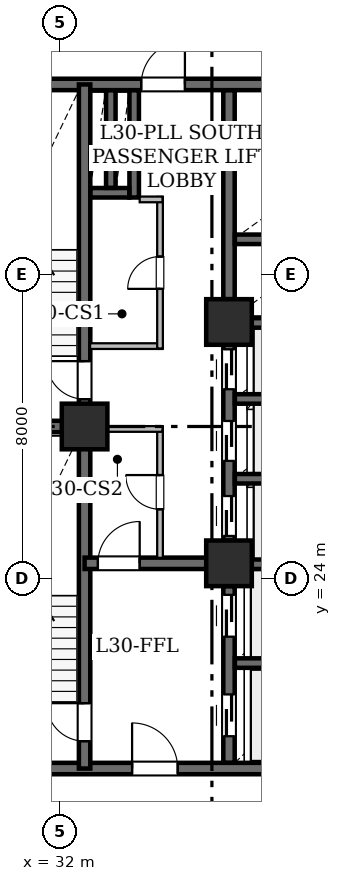
"""IFC4 building model, lengths in metres.
Left out: names, types, materials, properties, quantities, classifications, styles, units other than length and angle.
Written with IfcOpenShell. Run it as: python <this file> out.ifc"""

import sys

from ifc_helpers import new_model, si_unit, direction, frame, frame_2d, origin, origin_2d, place, context, subcontext, project, spatial, rectangle, hollow_rectangle, extrude, element, fill, save


model = new_model("IFC4")
c1 = context("Model", 3, precision=1e-05, world=origin(), true_north=direction((0.0, 1.0)))
c2 = subcontext(c1, "Body", "Model", "MODEL_VIEW")
j1 = project(units=[si_unit("LENGTHUNIT", "METRE"), si_unit("PLANEANGLEUNIT", "RADIAN")], contexts=[c1])
p1 = place(None, origin())
s1 = spatial("IfcSite", under=j1, at=p1, CompositionType="ELEMENT")
p2 = place(p1, origin())
s2 = spatial("IfcBuilding", under=s1, at=p2, CompositionType="ELEMENT")
p3 = place(p2, frame((0.0, 0.0, 120.15)))
s3 = spatial("IfcBuildingStorey", under=s2, at=p3, CompositionType="ELEMENT", Elevation=120.15)
for number, where, z_axis, x_axis in (
    (1, (32.65, 28.0, 0.0), (0.0, 0.0, 1.0), (1.0, 0.0, 0.0)),
    (2, (36.45, 24.4, 0.0), (0.0, 0.0, 1.0), (1.0, 0.0, 0.0)),
    (3, (36.45, 30.75, 0.0), (0.0, 0.0, 1.0), (1.0, 0.0, 0.0)),
):
    element("IfcColumn", number, at=place(p3, frame(where, z_axis=z_axis, x_axis=x_axis)), inside=s3, PredefinedType="COLUMN", context=c2, shape_type="SweptSolid", body=[
        extrude(hollow_rectangle(XDim=1.2, YDim=1.2, WallThickness=0.06, at=origin_2d()), origin(), (0.0, 0.0, 1.0), 3.65),
    ])
p4 = place(p3, frame((29.0, 19.0, 0.0), z_axis=(0.0, 0.0, 1.0), x_axis=(1.0, 0.0, 0.0)))
e4 = element("IfcWall", 4, at=p4, inside=s3, PredefinedType="SHEAR", context=c2, shape_type="SweptSolid", body=[
    extrude(rectangle(XDim=10.4, YDim=0.3, at=frame_2d((5.2, 0.0))), origin(), (0.0, 0.0, 1.0), 3.43),
])
p5 = place(p4, frame((4.9, 0.0, 0.0)))
e5 = element("IfcOpeningElement", 5, at=p5, cuts=e4, PredefinedType="OPENING", context=c2, shape_type="SweptSolid", body=[
    extrude(rectangle(XDim=1.2, YDim=2.15, at=frame_2d((0.6, 1.075))), frame((0.0, 0.16, 0.0), z_axis=(0.0, -1.0, 0.0), x_axis=(1.0, 0.0, 0.0)), (0.0, 0.0, 1.0), 0.32),
])
p6 = place(p3, frame((29.0, 37.0, 0.0), z_axis=(0.0, 0.0, 1.0), x_axis=(1.0, 0.0, 0.0)))
e6 = element("IfcWall", 6, at=p6, inside=s3, PredefinedType="SHEAR", context=c2, shape_type="SweptSolid", body=[
    extrude(rectangle(XDim=10.4, YDim=0.3, at=frame_2d((5.2, 0.0))), origin(), (0.0, 0.0, 1.0), 3.43),
])
p7 = place(p6, frame((5.14, 0.0, 0.0)))
e7 = element("IfcOpeningElement", 7, at=p7, cuts=e6, PredefinedType="OPENING", context=c2, shape_type="SweptSolid", body=[
    extrude(rectangle(XDim=1.15, YDim=2.2, at=frame_2d((0.575, 1.1))), frame((0.0, 0.16, 0.0), z_axis=(0.0, -1.0, 0.0), x_axis=(1.0, 0.0, 0.0)), (0.0, 0.0, 1.0), 0.32),
])
p8 = place(p3, frame((32.65, 19.0, 0.0), z_axis=(0.0, 0.0, 1.0), x_axis=(0.0, 1.0, 0.0)))
e8 = element("IfcWall", 8, at=p8, inside=s3, PredefinedType="SHEAR", context=c2, shape_type="SweptSolid", body=[
    extrude(rectangle(XDim=9.0, YDim=0.3, at=frame_2d((4.5, 0.0))), origin(), (0.0, 0.0, 1.0), 3.43),
])
p9 = place(p8, frame((0.72, 0.0, 0.0)))
e9 = element("IfcOpeningElement", 9, at=p9, cuts=e8, PredefinedType="OPENING", context=c2, shape_type="SweptSolid", body=[
    extrude(rectangle(XDim=1.0, YDim=2.15, at=frame_2d((0.5, 1.075))), frame((0.0, 0.16, 0.0), z_axis=(0.0, -1.0, 0.0), x_axis=(1.0, 0.0, 0.0)), (0.0, 0.0, 1.0), 0.32),
])
p10 = place(p3, frame((32.65, 28.0, 0.0), z_axis=(0.0, 0.0, 1.0), x_axis=(0.0, 1.0, 0.0)))
e10 = element("IfcWall", 10, at=p10, inside=s3, PredefinedType="SHEAR", context=c2, shape_type="SweptSolid", body=[
    extrude(rectangle(XDim=9.0, YDim=0.3, at=frame_2d((4.5, 0.0))), origin(), (0.0, 0.0, 1.0), 3.43),
])
p11 = place(p10, frame((0.72, 0.0, 0.0)))
e11 = element("IfcOpeningElement", 11, at=p11, cuts=e10, PredefinedType="OPENING", context=c2, shape_type="SweptSolid", body=[
    extrude(rectangle(XDim=1.0, YDim=2.15, at=frame_2d((0.5, 1.075))), frame((0.0, 0.16, 0.0), z_axis=(0.0, -1.0, 0.0), x_axis=(1.0, 0.0, 0.0)), (0.0, 0.0, 1.0), 0.32),
])
p12 = place(p3, frame((29.0, 28.0, 0.0), z_axis=(0.0, 0.0, 1.0), x_axis=(1.0, 0.0, 0.0)))
e12 = element("IfcWall", 12, at=p12, inside=s3, PredefinedType="SHEAR", context=c2, shape_type="SweptSolid", body=[
    extrude(rectangle(XDim=3.65, YDim=0.3, at=frame_2d((1.825, 0.0))), origin(), (0.0, 0.0, 1.0), 3.43),
])
p13 = place(p3, frame((32.65, 24.4, 0.0), z_axis=(0.0, 0.0, 1.0), x_axis=(1.0, 0.0, 0.0)))
e13 = element("IfcWall", 13, at=p13, inside=s3, PredefinedType="SHEAR", context=c2, shape_type="SweptSolid", body=[
    extrude(rectangle(XDim=3.8, YDim=0.3, at=frame_2d((1.9, 0.0))), origin(), (0.0, 0.0, 1.0), 3.43),
])
p14 = place(p13, frame((0.35, 0.0, 0.0)))
e14 = element("IfcOpeningElement", 14, at=p14, cuts=e13, PredefinedType="OPENING", context=c2, shape_type="SweptSolid", body=[
    extrude(rectangle(XDim=1.1, YDim=2.15, at=frame_2d((0.55, 1.075))), frame((0.0, 0.16, 0.0), z_axis=(0.0, -1.0, 0.0), x_axis=(1.0, 0.0, 0.0)), (0.0, 0.0, 1.0), 0.32),
])
p15 = place(p3, frame((36.45, 19.154, 0.0), z_axis=(0.0, 0.0, 1.0), x_axis=(0.0, 1.0, 0.0)))
e15 = element("IfcWall", 15, at=p15, inside=s3, PredefinedType="SHEAR", context=c2, shape_type="SweptSolid", body=[
    extrude(rectangle(XDim=4.646, YDim=0.3, at=frame_2d((2.323, 0.0))), origin(), (0.0, 0.0, 1.0), 3.43),
])
p16 = place(p15, frame((0.696, 0.0, 0.0)))
e16 = element("IfcOpeningElement", 16, at=p16, cuts=e15, PredefinedType="OPENING", context=c2, shape_type="SweptSolid", body=[
    extrude(rectangle(XDim=1.1, YDim=2.15, at=frame_2d((0.55, 1.075))), frame((0.0, 0.16, 0.0), z_axis=(0.0, -1.0, 0.0), x_axis=(1.0, 0.0, 0.0)), (0.0, 0.0, 1.0), 0.32),
])
p17 = place(p15, frame((3.316, 0.0, 0.0)))
e17 = element("IfcOpeningElement", 17, at=p17, cuts=e15, PredefinedType="OPENING", context=c2, shape_type="SweptSolid", body=[
    extrude(rectangle(XDim=1.1, YDim=2.15, at=frame_2d((0.55, 1.075))), frame((0.0, 0.16, 0.0), z_axis=(0.0, -1.0, 0.0), x_axis=(1.0, 0.0, 0.0)), (0.0, 0.0, 1.0), 0.32),
])
p18 = place(p3, frame((36.45, 25.0, 0.0), z_axis=(0.0, 0.0, 1.0), x_axis=(0.0, 1.0, 0.0)))
e18 = element("IfcWall", 18, at=p18, inside=s3, PredefinedType="SHEAR", context=c2, shape_type="SweptSolid", body=[
    extrude(rectangle(XDim=5.15, YDim=0.3, at=frame_2d((2.575, 0.0))), origin(), (0.0, 0.0, 1.0), 3.43),
])
p19 = place(p18, frame((0.12, 0.0, 0.0)))
e19 = element("IfcOpeningElement", 19, at=p19, cuts=e18, PredefinedType="OPENING", context=c2, shape_type="SweptSolid", body=[
    extrude(rectangle(XDim=1.05, YDim=2.15, at=frame_2d((0.525, 1.075))), frame((0.0, 0.16, 0.0), z_axis=(0.0, -1.0, 0.0), x_axis=(1.0, 0.0, 0.0)), (0.0, 0.0, 1.0), 0.32),
])
p20 = place(p18, frame((2.095, 0.0, 0.0)))
e20 = element("IfcOpeningElement", 20, at=p20, cuts=e18, PredefinedType="OPENING", context=c2, shape_type="SweptSolid", body=[
    extrude(rectangle(XDim=1.05, YDim=2.15, at=frame_2d((0.525, 1.075))), frame((0.0, 0.16, 0.0), z_axis=(0.0, -1.0, 0.0), x_axis=(1.0, 0.0, 0.0)), (0.0, 0.0, 1.0), 0.32),
])
p21 = place(p18, frame((3.98, 0.0, 0.0)))
e21 = element("IfcOpeningElement", 21, at=p21, cuts=e18, PredefinedType="OPENING", context=c2, shape_type="SweptSolid", body=[
    extrude(rectangle(XDim=1.05, YDim=2.15, at=frame_2d((0.525, 1.075))), frame((0.0, 0.16, 0.0), z_axis=(0.0, -1.0, 0.0), x_axis=(1.0, 0.0, 0.0)), (0.0, 0.0, 1.0), 0.32),
])
p22 = place(p3, frame((36.45, 31.35, 0.0), z_axis=(0.0, 0.0, 1.0), x_axis=(0.0, 1.0, 0.0)))
e22 = element("IfcWall", 22, at=p22, inside=s3, PredefinedType="SHEAR", context=c2, shape_type="SweptSolid", body=[
    extrude(rectangle(XDim=5.496, YDim=0.3, at=frame_2d((2.748, 0.0))), origin(), (0.0, 0.0, 1.0), 3.43),
])
for number, where, z_axis, x_axis in (
    (23, (36.604, 21.775, 0.0), (0.0, 0.0, 1.0), (1.0, 0.0, 0.0)),
    (24, (36.604, 24.375, 0.0), (0.0, 0.0, 1.0), (1.0, 0.0, 0.0)),
    (25, (36.604, 26.625, 0.0), (0.0, 0.0, 1.0), (1.0, 0.0, 0.0)),
    (26, (36.604, 28.725, 0.0), (0.0, 0.0, 1.0), (1.0, 0.0, 0.0)),
    (27, (36.604, 30.725, 0.0), (0.0, 0.0, 1.0), (1.0, 0.0, 0.0)),
    (28, (36.604, 32.925, 0.0), (0.0, 0.0, 1.0), (1.0, 0.0, 0.0)),
    (29, (36.604, 34.975, 0.0), (0.0, 0.0, 1.0), (1.0, 0.0, 0.0)),
):
    element("IfcWall", number, at=place(p3, frame(where, z_axis=z_axis, x_axis=x_axis)), inside=s3, PredefinedType="SHEAR", context=c2, shape_type="SweptSolid", body=[
        extrude(rectangle(XDim=2.642, YDim=0.25, at=frame_2d((1.321, 0.0))), origin(), (0.0, 0.0, 1.0), 3.43),
    ])
p23 = place(p3, frame((33.955, 34.025, 0.0), z_axis=(0.0, 0.0, 1.0), x_axis=(0.0, 1.0, 0.0)))
e30 = element("IfcWall", 30, at=p23, inside=s3, PredefinedType="SHEAR", context=c2, shape_type="SweptSolid", body=[
    extrude(rectangle(XDim=2.821, YDim=0.25, at=frame_2d((1.411, 0.0))), origin(), (0.0, 0.0, 1.0), 3.43),
])
p24 = place(p3, frame((32.804, 34.15, 0.0), z_axis=(0.0, 0.0, 1.0), x_axis=(1.0, 0.0, 0.0)))
e31 = element("IfcWall", 31, at=p24, inside=s3, PredefinedType="SHEAR", context=c2, shape_type="SweptSolid", body=[
    extrude(rectangle(XDim=1.022, YDim=0.25, at=frame_2d((0.511, 0.0))), origin(), (0.0, 0.0, 1.0), 3.43),
])
p25 = place(p3, frame((33.34, 34.279, 0.0), z_axis=(0.0, 0.0, 1.0), x_axis=(0.0, 1.0, 0.0)))
e32 = element("IfcWall", 32, at=p25, inside=s3, PredefinedType="SHEAR", context=c2, shape_type="SweptSolid", body=[
    extrude(rectangle(XDim=2.567, YDim=0.25, at=frame_2d((1.283, 0.0))), origin(), (0.0, 0.0, 1.0), 3.43),
])
p26 = place(p3, frame((32.794, 30.115, 0.0), z_axis=(0.0, 0.0, 1.0), x_axis=(1.0, 0.0, 0.0)))
e33 = element("IfcWall", 33, at=p26, inside=s3, PredefinedType="STANDARD", context=c2, shape_type="SweptSolid", body=[
    extrude(rectangle(XDim=1.906, YDim=0.15, at=frame_2d((0.953, 0.0))), origin(), (0.0, 0.0, 1.0), 2.887),
])
p27 = place(p3, frame((34.635, 30.052, 0.0), z_axis=(0.0, 0.0, 1.0), x_axis=(0.0, 1.0, 0.0)))
e34 = element("IfcWall", 34, at=p27, inside=s3, PredefinedType="STANDARD", context=c2, shape_type="SweptSolid", body=[
    extrude(rectangle(XDim=3.988, YDim=0.15, at=frame_2d((1.994, 0.0))), origin(), (0.0, 0.0, 1.0), 3.43),
])
p28 = place(p27, frame((1.569, 0.0, 0.0)))
e35 = element("IfcOpeningElement", 35, at=p28, cuts=e34, PredefinedType="OPENING", context=c2, shape_type="SweptSolid", body=[
    extrude(rectangle(XDim=0.85, YDim=2.1, at=frame_2d((0.425, 1.05))), frame((0.0, 0.085, 0.0), z_axis=(0.0, -1.0, 0.0), x_axis=(1.0, 0.0, 0.0)), (0.0, 0.0, 1.0), 0.17),
])
p29 = place(p3, frame((34.7, 33.975, 0.0), z_axis=(0.0, 0.0, 1.0), x_axis=(-1.0, 0.0, 0.0)))
e36 = element("IfcWall", 36, at=p29, inside=s3, PredefinedType="STANDARD", context=c2, shape_type="SweptSolid", body=[
    extrude(rectangle(XDim=0.6, YDim=0.15, at=frame_2d((0.3, 0.0))), origin(), (0.0, 0.0, 1.0), 3.43),
])
p30 = place(p3, frame((34.635, 24.544, 0.0), z_axis=(0.0, 0.0, 1.0), x_axis=(0.0, 1.0, 0.0)))
e37 = element("IfcWall", 37, at=p30, inside=s3, PredefinedType="STANDARD", context=c2, shape_type="SweptSolid", body=[
    extrude(rectangle(XDim=3.456, YDim=0.15, at=frame_2d((1.728, 0.0))), origin(), (0.0, 0.0, 1.0), 3.43),
])
p31 = place(p30, frame((1.278, 0.0, 0.0)))
e38 = element("IfcOpeningElement", 38, at=p31, cuts=e37, PredefinedType="OPENING", context=c2, shape_type="SweptSolid", body=[
    extrude(rectangle(XDim=0.9, YDim=2.1, at=frame_2d((0.45, 1.05))), frame((0.0, 0.085, 0.0), z_axis=(0.0, -1.0, 0.0), x_axis=(1.0, 0.0, 0.0)), (0.0, 0.0, 1.0), 0.17),
])
p32 = place(p3, frame((34.7, 27.935, 0.0), z_axis=(0.0, 0.0, 1.0), x_axis=(-1.0, 0.0, 0.0)))
e39 = element("IfcWall", 39, at=p32, inside=s3, PredefinedType="STANDARD", context=c2, shape_type="SweptSolid", body=[
    extrude(rectangle(XDim=1.906, YDim=0.15, at=frame_2d((0.953, 0.0))), origin(), (0.0, 0.0, 1.0), 2.887),
])
p33 = place(p9, origin())
e40 = element("IfcDoor", 40, at=p33, inside=s3, OperationType="SINGLE_SWING_RIGHT", PredefinedType="DOOR", context=c2, shape_type="SweptSolid", body=[
    extrude(rectangle(XDim=1.0, YDim=2.15, at=frame_2d((0.5, 1.075))), frame((0.0, 0.025, 0.0), z_axis=(0.0, -1.0, 0.0), x_axis=(1.0, 0.0, 0.0)), (0.0, 0.0, 1.0), 0.05),
])
fill(e9, e40)
p34 = place(p11, origin())
e41 = element("IfcDoor", 41, at=p34, inside=s3, OperationType="SINGLE_SWING_RIGHT", PredefinedType="DOOR", context=c2, shape_type="SweptSolid", body=[
    extrude(rectangle(XDim=1.0, YDim=2.15, at=frame_2d((0.5, 1.075))), frame((0.0, 0.025, 0.0), z_axis=(0.0, -1.0, 0.0), x_axis=(1.0, 0.0, 0.0)), (0.0, 0.0, 1.0), 0.05),
])
fill(e11, e41)
p35 = place(p14, origin())
e42 = element("IfcDoor", 42, at=p35, inside=s3, OperationType="SINGLE_SWING_RIGHT", PredefinedType="DOOR", context=c2, shape_type="SweptSolid", body=[
    extrude(rectangle(XDim=1.1, YDim=2.15, at=frame_2d((0.55, 1.075))), frame((0.0, 0.025, 0.0), z_axis=(0.0, -1.0, 0.0), x_axis=(1.0, 0.0, 0.0)), (0.0, 0.0, 1.0), 0.05),
])
fill(e14, e42)
p36 = place(p5, origin())
e43 = element("IfcDoor", 43, at=p36, inside=s3, OperationType="SINGLE_SWING_LEFT", PredefinedType="DOOR", context=c2, shape_type="SweptSolid", body=[
    extrude(rectangle(XDim=1.2, YDim=2.15, at=frame_2d((0.6, 1.075))), frame((0.0, 0.025, 0.0), z_axis=(0.0, -1.0, 0.0), x_axis=(1.0, 0.0, 0.0)), (0.0, 0.0, 1.0), 0.05),
])
fill(e5, e43)
p37 = place(p7, origin())
e44 = element("IfcDoor", 44, at=p37, inside=s3, OperationType="SINGLE_SWING_RIGHT", PredefinedType="DOOR", context=c2, shape_type="SweptSolid", body=[
    extrude(rectangle(XDim=1.15, YDim=2.2, at=frame_2d((0.575, 1.1))), frame((0.0, 0.025, 0.0), z_axis=(0.0, -1.0, 0.0), x_axis=(1.0, 0.0, 0.0)), (0.0, 0.0, 1.0), 0.05),
])
fill(e7, e44)
p38 = place(p16, origin())
e45 = element("IfcDoor", 45, at=p38, inside=s3, OperationType="SLIDING_TO_LEFT", PredefinedType="DOOR", context=c2, shape_type="SweptSolid", body=[
    extrude(rectangle(XDim=1.1, YDim=2.15, at=frame_2d((0.55, 1.075))), frame((0.0, 0.025, 0.0), z_axis=(0.0, -1.0, 0.0), x_axis=(1.0, 0.0, 0.0)), (0.0, 0.0, 1.0), 0.05),
])
fill(e16, e45)
p39 = place(p17, origin())
e46 = element("IfcDoor", 46, at=p39, inside=s3, OperationType="SLIDING_TO_LEFT", PredefinedType="DOOR", context=c2, shape_type="SweptSolid", body=[
    extrude(rectangle(XDim=1.1, YDim=2.15, at=frame_2d((0.55, 1.075))), frame((0.0, 0.025, 0.0), z_axis=(0.0, -1.0, 0.0), x_axis=(1.0, 0.0, 0.0)), (0.0, 0.0, 1.0), 0.05),
])
fill(e17, e46)
p40 = place(p19, origin())
e47 = element("IfcDoor", 47, at=p40, inside=s3, OperationType="SLIDING_TO_LEFT", PredefinedType="DOOR", context=c2, shape_type="SweptSolid", body=[
    extrude(rectangle(XDim=1.05, YDim=2.15, at=frame_2d((0.525, 1.075))), frame((0.0, 0.025, 0.0), z_axis=(0.0, -1.0, 0.0), x_axis=(1.0, 0.0, 0.0)), (0.0, 0.0, 1.0), 0.05),
])
fill(e19, e47)
p41 = place(p20, origin())
e48 = element("IfcDoor", 48, at=p41, inside=s3, OperationType="SLIDING_TO_LEFT", PredefinedType="DOOR", context=c2, shape_type="SweptSolid", body=[
    extrude(rectangle(XDim=1.05, YDim=2.15, at=frame_2d((0.525, 1.075))), frame((0.0, 0.025, 0.0), z_axis=(0.0, -1.0, 0.0), x_axis=(1.0, 0.0, 0.0)), (0.0, 0.0, 1.0), 0.05),
])
fill(e20, e48)
p42 = place(p21, origin())
e49 = element("IfcDoor", 49, at=p42, inside=s3, OperationType="SLIDING_TO_LEFT", PredefinedType="DOOR", context=c2, shape_type="SweptSolid", body=[
    extrude(rectangle(XDim=1.05, YDim=2.15, at=frame_2d((0.525, 1.075))), frame((0.0, 0.025, 0.0), z_axis=(0.0, -1.0, 0.0), x_axis=(1.0, 0.0, 0.0)), (0.0, 0.0, 1.0), 0.05),
])
fill(e21, e49)
p43 = place(p28, origin())
e50 = element("IfcDoor", 50, at=p43, inside=s3, OperationType="SINGLE_SWING_LEFT", PredefinedType="DOOR", context=c2, shape_type="SweptSolid", body=[
    extrude(rectangle(XDim=0.85, YDim=2.1, at=frame_2d((0.425, 1.05))), frame((0.0, 0.025, 0.0), z_axis=(0.0, -1.0, 0.0), x_axis=(1.0, 0.0, 0.0)), (0.0, 0.0, 1.0), 0.05),
])
fill(e35, e50)
p44 = place(p31, origin())
e51 = element("IfcDoor", 51, at=p44, inside=s3, OperationType="SINGLE_SWING_RIGHT", PredefinedType="DOOR", context=c2, shape_type="SweptSolid", body=[
    extrude(rectangle(XDim=0.9, YDim=2.1, at=frame_2d((0.45, 1.05))), frame((0.0, 0.025, 0.0), z_axis=(0.0, -1.0, 0.0), x_axis=(1.0, 0.0, 0.0)), (0.0, 0.0, 1.0), 0.05),
])
fill(e38, e51)
save(model, sys.argv[1])
